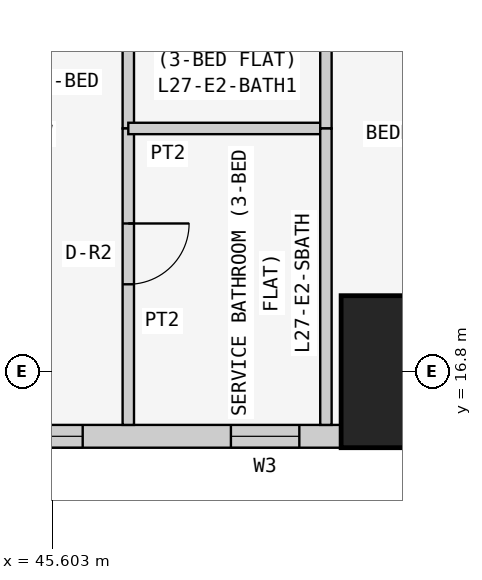
"""IFC4 building model, lengths in metres.
Left out: names, types, materials, properties, quantities, classifications, styles, units other than length and angle.
Written with IfcOpenShell. Run it as: python <this file> out.ifc"""

import sys

from ifc_helpers import new_model, si_unit, direction, frame, frame_2d, origin, origin_2d, place, context, subcontext, project, spatial, rectangle, extrude, element, fill, save


model = new_model("IFC4")
c1 = context("Model", 3, precision=1e-05, world=origin(), true_north=direction((0.0, 1.0)))
c2 = subcontext(c1, "Body", "Model", "MODEL_VIEW")
j1 = project(units=[si_unit("LENGTHUNIT", "METRE"), si_unit("PLANEANGLEUNIT", "RADIAN")], contexts=[c1])
p1 = place(None, origin())
s1 = spatial("IfcSite", under=j1, at=p1, CompositionType="ELEMENT")
p2 = place(p1, origin())
s2 = spatial("IfcBuilding", under=s1, at=p2, CompositionType="ELEMENT")
p3 = place(p2, frame((0.0, 0.0, 108.9)))
s3 = spatial("IfcBuildingStorey", under=s2, at=p3, CompositionType="ELEMENT", Elevation=108.9)
p4 = place(p3, frame((50.4, 16.8, 0.0), z_axis=(0.0, 0.0, 1.0), x_axis=(1.0, 0.0, 0.0)))
e1 = element("IfcColumn", 1, at=p4, inside=s3, PredefinedType="COLUMN", context=c2, shape_type="SweptSolid", body=[
    extrude(rectangle(XDim=2.0, YDim=2.0, at=origin_2d()), origin(), (0.0, 0.0, 1.0), 3.6),
])
p5 = place(p3, frame((43.0, 15.95, 0.0), z_axis=(0.0, 0.0, 1.0), x_axis=(1.0, 0.0, 0.0)))
e2 = element("IfcWall", 2, at=p5, inside=s3, PredefinedType="SOLIDWALL", context=c2, shape_type="SweptSolid", body=[
    extrude(rectangle(XDim=15.4, YDim=0.3, at=frame_2d((7.7, 0.0))), origin(), (0.0, 0.0, 1.0), 3.45),
])
p6 = place(p5, frame((1.2, 0.0, 0.9)))
e3 = element("IfcOpeningElement", 3, at=p6, cuts=e2, PredefinedType="OPENING", context=c2, shape_type="SweptSolid", body=[
    extrude(rectangle(XDim=1.8, YDim=1.5, at=frame_2d((0.9, 0.75))), frame((0.0, 0.16, 0.0), z_axis=(0.0, -1.0, 0.0), x_axis=(1.0, 0.0, 0.0)), (0.0, 0.0, 1.0), 0.32),
])
p7 = place(p5, frame((4.95, 0.0, 1.5)))
e4 = element("IfcOpeningElement", 4, at=p7, cuts=e2, PredefinedType="OPENING", context=c2, shape_type="SweptSolid", body=[
    extrude(rectangle(XDim=0.9, YDim=0.7, at=frame_2d((0.45, 0.35))), frame((0.0, 0.16, 0.0), z_axis=(0.0, -1.0, 0.0), x_axis=(1.0, 0.0, 0.0)), (0.0, 0.0, 1.0), 0.32),
])
p8 = place(p5, frame((8.5, 0.0, 0.9)))
e5 = element("IfcOpeningElement", 5, at=p8, cuts=e2, PredefinedType="OPENING", context=c2, shape_type="SweptSolid", body=[
    extrude(rectangle(XDim=1.8, YDim=1.5, at=frame_2d((0.9, 0.75))), frame((0.0, 0.16, 0.0), z_axis=(0.0, -1.0, 0.0), x_axis=(1.0, 0.0, 0.0)), (0.0, 0.0, 1.0), 0.32),
])
p9 = place(p5, frame((12.5, 0.0, 0.0)))
e6 = element("IfcOpeningElement", 6, at=p9, cuts=e2, PredefinedType="OPENING", context=c2, shape_type="SweptSolid", body=[
    extrude(rectangle(XDim=0.9, YDim=2.4, at=frame_2d((0.45, 1.2))), frame((0.0, 0.16, 0.0), z_axis=(0.0, -1.0, 0.0), x_axis=(1.0, 0.0, 0.0)), (0.0, 0.0, 1.0), 0.32),
])
p10 = place(p5, frame((13.5, 0.0, 0.9)))
e7 = element("IfcOpeningElement", 7, at=p10, cuts=e2, PredefinedType="OPENING", context=c2, shape_type="SweptSolid", body=[
    extrude(rectangle(XDim=1.2, YDim=1.5, at=frame_2d((0.6, 0.75))), frame((0.0, 0.16, 0.0), z_axis=(0.0, -1.0, 0.0), x_axis=(1.0, 0.0, 0.0)), (0.0, 0.0, 1.0), 0.32),
])
p11 = place(p3, frame((46.6, 22.971, 0.0), z_axis=(0.0, 0.0, 1.0), x_axis=(0.0, -1.0, 0.0)))
e8 = element("IfcWall", 8, at=p11, inside=s3, PredefinedType="PARTITIONING", context=c2, shape_type="SweptSolid", body=[
    extrude(rectangle(XDim=2.971, YDim=0.15, at=frame_2d((1.485, 0.0))), origin(), (0.0, 0.0, 1.0), 3.45),
])
p12 = place(p3, frame((46.6, 20.0, 0.0), z_axis=(0.0, 0.0, 1.0), x_axis=(0.0, -1.0, 0.0)))
e9 = element("IfcWall", 9, at=p12, inside=s3, PredefinedType="PARTITIONING", context=c2, shape_type="SweptSolid", body=[
    extrude(rectangle(XDim=3.9, YDim=0.15, at=frame_2d((1.95, 0.0))), origin(), (0.0, 0.0, 1.0), 3.45),
])
p13 = place(p12, frame((1.25, 0.0, 0.0)))
e10 = element("IfcOpeningElement", 10, at=p13, cuts=e9, PredefinedType="OPENING", context=c2, shape_type="SweptSolid", body=[
    extrude(rectangle(XDim=0.8, YDim=2.1, at=frame_2d((0.4, 1.05))), frame((0.0, 0.085, 0.0), z_axis=(0.0, -1.0, 0.0), x_axis=(1.0, 0.0, 0.0)), (0.0, 0.0, 1.0), 0.17),
])
p14 = place(p3, frame((49.2, 20.0, 0.0), z_axis=(0.0, 0.0, 1.0), x_axis=(-1.0, 0.0, 0.0)))
e11 = element("IfcWall", 11, at=p14, inside=s3, PredefinedType="PARTITIONING", context=c2, shape_type="SweptSolid", body=[
    extrude(rectangle(XDim=2.6, YDim=0.15, at=frame_2d((1.3, 0.0))), origin(), (0.0, 0.0, 1.0), 3.45),
])
p15 = place(p3, frame((49.2, 22.971, 0.0), z_axis=(0.0, 0.0, 1.0), x_axis=(0.0, -1.0, 0.0)))
e12 = element("IfcWall", 12, at=p15, inside=s3, PredefinedType="PARTITIONING", context=c2, shape_type="SweptSolid", body=[
    extrude(rectangle(XDim=2.971, YDim=0.15, at=frame_2d((1.485, 0.0))), origin(), (0.0, 0.0, 1.0), 3.45),
])
p16 = place(p3, frame((49.2, 20.0, 0.0), z_axis=(0.0, 0.0, 1.0), x_axis=(0.0, -1.0, 0.0)))
e13 = element("IfcWall", 13, at=p16, inside=s3, PredefinedType="PARTITIONING", context=c2, shape_type="SweptSolid", body=[
    extrude(rectangle(XDim=3.9, YDim=0.15, at=frame_2d((1.95, 0.0))), origin(), (0.0, 0.0, 1.0), 3.45),
])
p17 = place(p6, origin())
e14 = element("IfcWindow", 14, at=p17, inside=s3, PartitioningType="SINGLE_PANEL", PredefinedType="WINDOW", context=c2, shape_type="SweptSolid", body=[
    extrude(rectangle(XDim=1.8, YDim=1.5, at=frame_2d((0.9, 0.75))), frame((0.0, 0.03, 0.0), z_axis=(0.0, -1.0, 0.0), x_axis=(1.0, 0.0, 0.0)), (0.0, 0.0, 1.0), 0.06),
])
fill(e3, e14)
p18 = place(p7, origin())
e15 = element("IfcWindow", 15, at=p18, inside=s3, PartitioningType="SINGLE_PANEL", PredefinedType="WINDOW", context=c2, shape_type="SweptSolid", body=[
    extrude(rectangle(XDim=0.9, YDim=0.7, at=frame_2d((0.45, 0.35))), frame((0.0, 0.03, 0.0), z_axis=(0.0, -1.0, 0.0), x_axis=(1.0, 0.0, 0.0)), (0.0, 0.0, 1.0), 0.06),
])
fill(e4, e15)
p19 = place(p13, origin())
e16 = element("IfcDoor", 16, at=p19, inside=s3, OperationType="SINGLE_SWING_LEFT", PredefinedType="DOOR", context=c2, shape_type="SweptSolid", body=[
    extrude(rectangle(XDim=0.8, YDim=2.1, at=frame_2d((0.4, 1.05))), frame((0.0, 0.025, 0.0), z_axis=(0.0, -1.0, 0.0), x_axis=(1.0, 0.0, 0.0)), (0.0, 0.0, 1.0), 0.05),
])
fill(e10, e16)
save(model, sys.argv[1])
